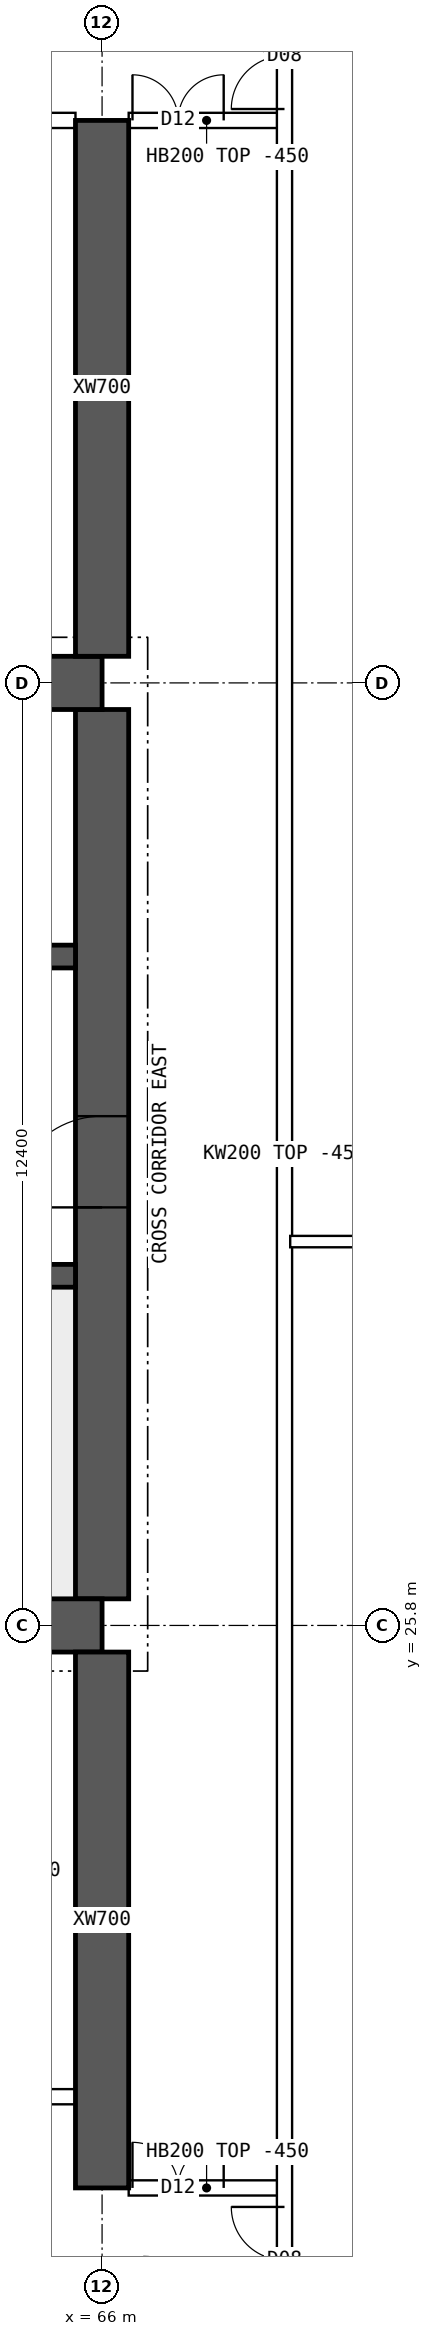
"""IFC4 building model, lengths in metres.
Left out: names, types, materials, properties, quantities, classifications, styles, units other than length and angle.
Written with IfcOpenShell. Run it as: python <this file> out.ifc"""

import sys

from ifc_helpers import new_model, si_unit, direction, frame, frame_2d, origin, place, context, subcontext, project, spatial, polyline, rectangle, outline, extrude, element, fill, save


model = new_model("IFC4")
c1 = context("Model", 3, precision=1e-05, world=origin(), true_north=direction((0.0, 1.0)))
c2 = subcontext(c1, "Body", "Model", "MODEL_VIEW")
j1 = project(units=[si_unit("LENGTHUNIT", "METRE"), si_unit("PLANEANGLEUNIT", "RADIAN")], contexts=[c1])
p1 = place(None, origin())
s1 = spatial("IfcSite", under=j1, at=p1, CompositionType="ELEMENT")
p2 = place(p1, origin())
s2 = spatial("IfcBuilding", under=s1, at=p2, CompositionType="ELEMENT")
p3 = place(p2, frame((0.0, 0.0, 242.8)))
s3 = spatial("IfcBuildingStorey", under=s2, at=p3, CompositionType="ELEMENT", Elevation=242.8)
for number, where, z_axis, x_axis in (
    (1, (18.0, 25.8, 0.0), (0.0, 0.0, 1.0), (1.0, 0.0, 0.0)),
    (2, (18.0, 38.2, 0.0), (0.0, 0.0, 1.0), (1.0, 0.0, 0.0)),
):
    element("IfcWall", number, at=place(p3, frame(where, z_axis=z_axis, x_axis=x_axis)), inside=s3, PredefinedType="SHEAR", context=c2, shape_type="SweptSolid", body=[
        extrude(rectangle(XDim=48.0, YDim=0.7, at=frame_2d((24.0, 0.0))), origin(), (0.0, 0.0, 1.0), 3.75),
    ])
p4 = place(p3, frame((66.0, 26.15, 0.0), z_axis=(0.0, 0.0, 1.0), x_axis=(0.0, 1.0, 0.0)))
e3 = element("IfcWall", 3, at=p4, inside=s3, PredefinedType="SHEAR", context=c2, shape_type="SweptSolid", body=[
    extrude(rectangle(XDim=11.7, YDim=0.7, at=frame_2d((5.85, 0.0))), origin(), (0.0, 0.0, 1.0), 3.75),
])
p5 = place(p4, frame((5.15, 0.0, 0.0)))
e4 = element("IfcOpeningElement", 4, at=p5, cuts=e3, PredefinedType="OPENING", context=c2, shape_type="SweptSolid", body=[
    extrude(rectangle(XDim=1.2, YDim=2.1, at=frame_2d((0.6, 1.05))), frame((0.0, 0.36, 0.0), z_axis=(0.0, -1.0, 0.0), x_axis=(1.0, 0.0, 0.0)), (0.0, 0.0, 1.0), 0.72),
])
p6 = place(p3, frame((18.35, 30.4, 0.0), z_axis=(0.0, 0.0, 1.0), x_axis=(1.0, 0.0, 0.0)))
e5 = element("IfcWall", 5, at=p6, inside=s3, PredefinedType="SHEAR", context=c2, shape_type="SweptSolid", body=[
    extrude(rectangle(XDim=47.3, YDim=0.3, at=frame_2d((23.65, 0.0))), origin(), (0.0, 0.0, 1.0), 3.75),
])
p7 = place(p6, frame((0.4, 0.0, 0.0)))
e6 = element("IfcOpeningElement", 6, at=p7, cuts=e5, PredefinedType="OPENING", context=c2, shape_type="SweptSolid", body=[
    extrude(rectangle(XDim=1.0, YDim=2.1, at=frame_2d((0.5, 1.05))), frame((0.0, 0.16, 0.0), z_axis=(0.0, -1.0, 0.0), x_axis=(1.0, 0.0, 0.0)), (0.0, 0.0, 1.0), 0.32),
])
p8 = place(p6, frame((45.9, 0.0, 0.0)))
e7 = element("IfcOpeningElement", 7, at=p8, cuts=e5, PredefinedType="OPENING", context=c2, shape_type="SweptSolid", body=[
    extrude(rectangle(XDim=1.0, YDim=2.1, at=frame_2d((0.5, 1.05))), frame((0.0, 0.16, 0.0), z_axis=(0.0, -1.0, 0.0), x_axis=(1.0, 0.0, 0.0)), (0.0, 0.0, 1.0), 0.32),
])
p9 = place(p6, frame((8.4, 0.0, 0.0)))
e8 = element("IfcOpeningElement", 8, at=p9, cuts=e5, PredefinedType="OPENING", context=c2, shape_type="SweptSolid", body=[
    extrude(rectangle(XDim=1.1, YDim=2.1, at=frame_2d((0.55, 1.05))), frame((0.0, 0.16, 0.0), z_axis=(0.0, -1.0, 0.0), x_axis=(1.0, 0.0, 0.0)), (0.0, 0.0, 1.0), 0.32),
])
p10 = place(p6, frame((11.0, 0.0, 0.0)))
e9 = element("IfcOpeningElement", 9, at=p10, cuts=e5, PredefinedType="OPENING", context=c2, shape_type="SweptSolid", body=[
    extrude(rectangle(XDim=1.1, YDim=2.1, at=frame_2d((0.55, 1.05))), frame((0.0, 0.16, 0.0), z_axis=(0.0, -1.0, 0.0), x_axis=(1.0, 0.0, 0.0)), (0.0, 0.0, 1.0), 0.32),
])
p11 = place(p6, frame((13.6, 0.0, 0.0)))
e10 = element("IfcOpeningElement", 10, at=p11, cuts=e5, PredefinedType="OPENING", context=c2, shape_type="SweptSolid", body=[
    extrude(rectangle(XDim=1.1, YDim=2.1, at=frame_2d((0.55, 1.05))), frame((0.0, 0.16, 0.0), z_axis=(0.0, -1.0, 0.0), x_axis=(1.0, 0.0, 0.0)), (0.0, 0.0, 1.0), 0.32),
])
p12 = place(p6, frame((16.2, 0.0, 0.0)))
e11 = element("IfcOpeningElement", 11, at=p12, cuts=e5, PredefinedType="OPENING", context=c2, shape_type="SweptSolid", body=[
    extrude(rectangle(XDim=1.1, YDim=2.1, at=frame_2d((0.55, 1.05))), frame((0.0, 0.16, 0.0), z_axis=(0.0, -1.0, 0.0), x_axis=(1.0, 0.0, 0.0)), (0.0, 0.0, 1.0), 0.32),
])
p13 = place(p6, frame((18.975, 0.0, 0.0)))
e12 = element("IfcOpeningElement", 12, at=p13, cuts=e5, PredefinedType="OPENING", context=c2, shape_type="SweptSolid", body=[
    extrude(rectangle(XDim=0.9, YDim=2.1, at=frame_2d((0.45, 1.05))), frame((0.0, 0.16, 0.0), z_axis=(0.0, -1.0, 0.0), x_axis=(1.0, 0.0, 0.0)), (0.0, 0.0, 1.0), 0.32),
])
p14 = place(p6, frame((24.475, 0.0, 0.0)))
e13 = element("IfcOpeningElement", 13, at=p14, cuts=e5, PredefinedType="OPENING", context=c2, shape_type="SweptSolid", body=[
    extrude(rectangle(XDim=0.9, YDim=2.1, at=frame_2d((0.45, 1.05))), frame((0.0, 0.16, 0.0), z_axis=(0.0, -1.0, 0.0), x_axis=(1.0, 0.0, 0.0)), (0.0, 0.0, 1.0), 0.32),
])
p15 = place(p6, frame((30.267, 0.0, 0.0)))
e14 = element("IfcOpeningElement", 14, at=p15, cuts=e5, PredefinedType="OPENING", context=c2, shape_type="SweptSolid", body=[
    extrude(rectangle(XDim=1.1, YDim=2.1, at=frame_2d((0.55, 1.05))), frame((0.0, 0.16, 0.0), z_axis=(0.0, -1.0, 0.0), x_axis=(1.0, 0.0, 0.0)), (0.0, 0.0, 1.0), 0.32),
])
p16 = place(p6, frame((33.8, 0.0, 0.0)))
e15 = element("IfcOpeningElement", 15, at=p16, cuts=e5, PredefinedType="OPENING", context=c2, shape_type="SweptSolid", body=[
    extrude(rectangle(XDim=1.1, YDim=2.1, at=frame_2d((0.55, 1.05))), frame((0.0, 0.16, 0.0), z_axis=(0.0, -1.0, 0.0), x_axis=(1.0, 0.0, 0.0)), (0.0, 0.0, 1.0), 0.32),
])
p17 = place(p6, frame((37.333, 0.0, 0.0)))
e16 = element("IfcOpeningElement", 16, at=p17, cuts=e5, PredefinedType="OPENING", context=c2, shape_type="SweptSolid", body=[
    extrude(rectangle(XDim=1.1, YDim=2.1, at=frame_2d((0.55, 1.05))), frame((0.0, 0.16, 0.0), z_axis=(0.0, -1.0, 0.0), x_axis=(1.0, 0.0, 0.0)), (0.0, 0.0, 1.0), 0.32),
])
p18 = place(p3, frame((18.35, 34.6, 0.0), z_axis=(0.0, 0.0, 1.0), x_axis=(1.0, 0.0, 0.0)))
e17 = element("IfcWall", 17, at=p18, inside=s3, PredefinedType="SHEAR", context=c2, shape_type="SweptSolid", body=[
    extrude(rectangle(XDim=47.3, YDim=0.3, at=frame_2d((23.65, 0.0))), origin(), (0.0, 0.0, 1.0), 3.75),
])
p19 = place(p18, frame((0.9, 0.0, 0.0)))
e18 = element("IfcOpeningElement", 18, at=p19, cuts=e17, PredefinedType="OPENING", context=c2, shape_type="SweptSolid", body=[
    extrude(rectangle(XDim=1.1, YDim=2.1, at=frame_2d((0.55, 1.05))), frame((0.0, 0.16, 0.0), z_axis=(0.0, -1.0, 0.0), x_axis=(1.0, 0.0, 0.0)), (0.0, 0.0, 1.0), 0.32),
])
p20 = place(p18, frame((45.3, 0.0, 0.0)))
e19 = element("IfcOpeningElement", 19, at=p20, cuts=e17, PredefinedType="OPENING", context=c2, shape_type="SweptSolid", body=[
    extrude(rectangle(XDim=1.1, YDim=2.1, at=frame_2d((0.55, 1.05))), frame((0.0, 0.16, 0.0), z_axis=(0.0, -1.0, 0.0), x_axis=(1.0, 0.0, 0.0)), (0.0, 0.0, 1.0), 0.32),
])
p21 = place(p18, frame((4.25, 0.0, 0.0)))
e20 = element("IfcOpeningElement", 20, at=p21, cuts=e17, PredefinedType="OPENING", context=c2, shape_type="SweptSolid", body=[
    extrude(rectangle(XDim=0.9, YDim=2.1, at=frame_2d((0.45, 1.05))), frame((0.0, 0.16, 0.0), z_axis=(0.0, -1.0, 0.0), x_axis=(1.0, 0.0, 0.0)), (0.0, 0.0, 1.0), 0.32),
])
p22 = place(p18, frame((42.15, 0.0, 0.0)))
e21 = element("IfcOpeningElement", 21, at=p22, cuts=e17, PredefinedType="OPENING", context=c2, shape_type="SweptSolid", body=[
    extrude(rectangle(XDim=0.9, YDim=2.1, at=frame_2d((0.45, 1.05))), frame((0.0, 0.16, 0.0), z_axis=(0.0, -1.0, 0.0), x_axis=(1.0, 0.0, 0.0)), (0.0, 0.0, 1.0), 0.32),
])
p23 = place(p18, frame((9.025, 0.0, 0.0)))
e22 = element("IfcOpeningElement", 22, at=p23, cuts=e17, PredefinedType="OPENING", context=c2, shape_type="SweptSolid", body=[
    extrude(rectangle(XDim=0.9, YDim=2.1, at=frame_2d((0.45, 1.05))), frame((0.0, 0.16, 0.0), z_axis=(0.0, -1.0, 0.0), x_axis=(1.0, 0.0, 0.0)), (0.0, 0.0, 1.0), 0.32),
])
p24 = place(p18, frame((12.999, 0.0, 0.0)))
e23 = element("IfcOpeningElement", 23, at=p24, cuts=e17, PredefinedType="OPENING", context=c2, shape_type="SweptSolid", body=[
    extrude(rectangle(XDim=0.9, YDim=2.1, at=frame_2d((0.45, 1.05))), frame((0.0, 0.16, 0.0), z_axis=(0.0, -1.0, 0.0), x_axis=(1.0, 0.0, 0.0)), (0.0, 0.0, 1.0), 0.32),
])
p25 = place(p18, frame((16.646, 0.0, 0.0)))
e24 = element("IfcOpeningElement", 24, at=p25, cuts=e17, PredefinedType="OPENING", context=c2, shape_type="SweptSolid", body=[
    extrude(rectangle(XDim=0.9, YDim=2.1, at=frame_2d((0.45, 1.05))), frame((0.0, 0.16, 0.0), z_axis=(0.0, -1.0, 0.0), x_axis=(1.0, 0.0, 0.0)), (0.0, 0.0, 1.0), 0.32),
])
p26 = place(p18, frame((20.405, 0.0, 0.0)))
e25 = element("IfcOpeningElement", 25, at=p26, cuts=e17, PredefinedType="OPENING", context=c2, shape_type="SweptSolid", body=[
    extrude(rectangle(XDim=0.9, YDim=2.1, at=frame_2d((0.45, 1.05))), frame((0.0, 0.16, 0.0), z_axis=(0.0, -1.0, 0.0), x_axis=(1.0, 0.0, 0.0)), (0.0, 0.0, 1.0), 0.32),
])
p27 = place(p18, frame((24.811, 0.0, 0.0)))
e26 = element("IfcOpeningElement", 26, at=p27, cuts=e17, PredefinedType="OPENING", context=c2, shape_type="SweptSolid", body=[
    extrude(rectangle(XDim=0.9, YDim=2.1, at=frame_2d((0.45, 1.05))), frame((0.0, 0.16, 0.0), z_axis=(0.0, -1.0, 0.0), x_axis=(1.0, 0.0, 0.0)), (0.0, 0.0, 1.0), 0.32),
])
p28 = place(p18, frame((27.608, 0.0, 0.0)))
e27 = element("IfcOpeningElement", 27, at=p28, cuts=e17, PredefinedType="OPENING", context=c2, shape_type="SweptSolid", body=[
    extrude(rectangle(XDim=0.9, YDim=2.1, at=frame_2d((0.45, 1.05))), frame((0.0, 0.16, 0.0), z_axis=(0.0, -1.0, 0.0), x_axis=(1.0, 0.0, 0.0)), (0.0, 0.0, 1.0), 0.32),
])
p29 = place(p18, frame((29.778, 0.0, 0.0)))
e28 = element("IfcOpeningElement", 28, at=p29, cuts=e17, PredefinedType="OPENING", context=c2, shape_type="SweptSolid", body=[
    extrude(rectangle(XDim=0.9, YDim=2.1, at=frame_2d((0.45, 1.05))), frame((0.0, 0.16, 0.0), z_axis=(0.0, -1.0, 0.0), x_axis=(1.0, 0.0, 0.0)), (0.0, 0.0, 1.0), 0.32),
])
p30 = place(p18, frame((33.577, 0.0, 0.0)))
e29 = element("IfcOpeningElement", 29, at=p30, cuts=e17, PredefinedType="OPENING", context=c2, shape_type="SweptSolid", body=[
    extrude(rectangle(XDim=0.9, YDim=2.1, at=frame_2d((0.45, 1.05))), frame((0.0, 0.16, 0.0), z_axis=(0.0, -1.0, 0.0), x_axis=(1.0, 0.0, 0.0)), (0.0, 0.0, 1.0), 0.32),
])
p31 = place(p18, frame((37.528, 0.0, 0.0)))
e30 = element("IfcOpeningElement", 30, at=p31, cuts=e17, PredefinedType="OPENING", context=c2, shape_type="SweptSolid", body=[
    extrude(rectangle(XDim=0.9, YDim=2.1, at=frame_2d((0.45, 1.05))), frame((0.0, 0.16, 0.0), z_axis=(0.0, -1.0, 0.0), x_axis=(1.0, 0.0, 0.0)), (0.0, 0.0, 1.0), 0.32),
])
for number, where, z_axis, x_axis in (
    (31, (66.0, 18.4, 0.0), (0.0, 0.0, 1.0), (0.0, 1.0, 0.0)),
    (32, (66.0, 38.55, 0.0), (0.0, 0.0, 1.0), (0.0, 1.0, 0.0)),
):
    element("IfcWall", number, at=place(p3, frame(where, z_axis=z_axis, x_axis=x_axis)), inside=s3, PredefinedType="SHEAR", context=c2, shape_type="SweptSolid", body=[
        extrude(rectangle(XDim=7.05, YDim=0.7, at=frame_2d((3.525, 0.0))), origin(), (0.0, 0.0, 1.0), 3.75),
    ])
p32 = place(p3, frame((66.35, 18.4, 0.0), z_axis=(0.0, 0.0, 1.0), x_axis=(1.0, 0.0, 0.0)))
e33 = element("IfcWall", 33, at=p32, inside=s3, PredefinedType="SOLIDWALL", context=c2, shape_type="SweptSolid", body=[
    extrude(rectangle(XDim=2.05, YDim=0.2, at=frame_2d((1.025, 0.0))), origin(), (0.0, 0.0, 1.0), 3.3),
])
p33 = place(p32, frame((0.05, 0.0, 0.0)))
e34 = element("IfcOpeningElement", 34, at=p33, cuts=e33, PredefinedType="OPENING", context=c2, shape_type="SweptSolid", body=[
    extrude(rectangle(XDim=1.2, YDim=2.1, at=frame_2d((0.6, 1.05))), frame((0.0, 0.11, 0.0), z_axis=(0.0, -1.0, 0.0), x_axis=(1.0, 0.0, 0.0)), (0.0, 0.0, 1.0), 0.22),
])
p34 = place(p3, frame((60.35, 45.6, 0.0), z_axis=(0.0, 0.0, 1.0), x_axis=(1.0, 0.0, 0.0)))
e35 = element("IfcWall", 35, at=p34, inside=s3, PredefinedType="SOLIDWALL", context=c2, shape_type="SweptSolid", body=[
    extrude(rectangle(XDim=5.3, YDim=0.2, at=frame_2d((2.65, 0.0))), origin(), (0.0, 0.0, 1.0), 3.3),
])
p35 = place(p34, frame((0.525, 0.0, 0.0)))
e36 = element("IfcOpeningElement", 36, at=p35, cuts=e35, PredefinedType="OPENING", context=c2, shape_type="SweptSolid", body=[
    extrude(rectangle(XDim=1.0, YDim=2.1, at=frame_2d((0.5, 1.05))), frame((0.0, 0.11, 0.0), z_axis=(0.0, -1.0, 0.0), x_axis=(1.0, 0.0, 0.0)), (0.0, 0.0, 1.0), 0.22),
])
p36 = place(p3, frame((66.35, 45.6, 0.0), z_axis=(0.0, 0.0, 1.0), x_axis=(1.0, 0.0, 0.0)))
e37 = element("IfcWall", 37, at=p36, inside=s3, PredefinedType="SOLIDWALL", context=c2, shape_type="SweptSolid", body=[
    extrude(rectangle(XDim=2.05, YDim=0.2, at=frame_2d((1.025, 0.0))), origin(), (0.0, 0.0, 1.0), 3.3),
])
p37 = place(p36, frame((0.05, 0.0, 0.0)))
e38 = element("IfcOpeningElement", 38, at=p37, cuts=e37, PredefinedType="OPENING", context=c2, shape_type="SweptSolid", body=[
    extrude(rectangle(XDim=1.2, YDim=2.1, at=frame_2d((0.6, 1.05))), frame((0.0, 0.11, 0.0), z_axis=(0.0, -1.0, 0.0), x_axis=(1.0, 0.0, 0.0)), (0.0, 0.0, 1.0), 0.22),
])
p38 = place(p3, frame((60.35, 19.6, 0.0), z_axis=(0.0, 0.0, 1.0), x_axis=(1.0, 0.0, 0.0)))
e39 = element("IfcWall", 39, at=p38, inside=s3, PredefinedType="SOLIDWALL", context=c2, shape_type="SweptSolid", body=[
    extrude(rectangle(XDim=5.3, YDim=0.2, at=frame_2d((2.65, 0.0))), origin(), (0.0, 0.0, 1.0), 3.3),
])
p39 = place(p38, frame((0.525, 0.0, 0.0)))
e40 = element("IfcOpeningElement", 40, at=p39, cuts=e39, PredefinedType="OPENING", context=c2, shape_type="SweptSolid", body=[
    extrude(rectangle(XDim=1.0, YDim=2.1, at=frame_2d((0.5, 1.05))), frame((0.0, 0.11, 0.0), z_axis=(0.0, -1.0, 0.0), x_axis=(1.0, 0.0, 0.0)), (0.0, 0.0, 1.0), 0.22),
])
p40 = place(p3, frame((68.475, 30.85, 0.0), z_axis=(0.0, 0.0, 1.0), x_axis=(1.0, 0.0, 0.0)))
e41 = element("IfcWall", 41, at=p40, inside=s3, PredefinedType="PARTITIONING", context=c2, shape_type="SweptSolid", body=[
    extrude(outline(polyline([(0.0, 0.0), (6.82, 0.0), (6.82, 3.3), (3.827, 3.3), (3.825, 2.85), (3.227, 2.85), (3.225, 3.3), (0.0, 3.3), (0.0, 0.0)])), frame((0.0, 0.075, 0.0), z_axis=(0.0, -1.0, 0.0), x_axis=(1.0, 0.0, 0.0)), (0.0, 0.0, 1.0), 0.15),
])
p41 = place(p3, frame((68.4, 11.646, 0.0), z_axis=(0.0, 0.0, 1.0), x_axis=(0.0, 1.0, 0.0)))
e42 = element("IfcWall", 42, at=p41, inside=s3, PredefinedType="SOLIDWALL", context=c2, shape_type="SweptSolid", body=[
    extrude(rectangle(XDim=40.708, YDim=0.2, at=frame_2d((20.354, 0.0))), origin(), (0.0, 0.0, 1.0), 3.3),
])
p42 = place(p41, frame((5.104, 0.0, 0.0)))
e43 = element("IfcOpeningElement", 43, at=p42, cuts=e42, PredefinedType="OPENING", context=c2, shape_type="SweptSolid", body=[
    extrude(rectangle(XDim=1.4, YDim=2.1, at=frame_2d((0.7, 1.05))), frame((0.0, 0.11, 0.0), z_axis=(0.0, -1.0, 0.0), x_axis=(1.0, 0.0, 0.0)), (0.0, 0.0, 1.0), 0.22),
])
p43 = place(p41, frame((34.104, 0.0, 0.0)))
e44 = element("IfcOpeningElement", 44, at=p43, cuts=e42, PredefinedType="OPENING", context=c2, shape_type="SweptSolid", body=[
    extrude(rectangle(XDim=1.4, YDim=2.1, at=frame_2d((0.7, 1.05))), frame((0.0, 0.11, 0.0), z_axis=(0.0, -1.0, 0.0), x_axis=(1.0, 0.0, 0.0)), (0.0, 0.0, 1.0), 0.22),
])
p44 = place(p5, origin())
e45 = element("IfcDoor", 45, at=p44, inside=s3, OperationType="SINGLE_SWING_LEFT", PredefinedType="DOOR", context=c2, shape_type="SweptSolid", body=[
    extrude(rectangle(XDim=1.2, YDim=2.1, at=frame_2d((0.6, 1.05))), frame((0.0, 0.025, 0.0), z_axis=(0.0, -1.0, 0.0), x_axis=(1.0, 0.0, 0.0)), (0.0, 0.0, 1.0), 0.05),
])
fill(e4, e45)
p45 = place(p33, origin())
e46 = element("IfcDoor", 46, at=p45, inside=s3, OperationType="DOUBLE_DOOR_SINGLE_SWING", PredefinedType="DOOR", context=c2, shape_type="SweptSolid", body=[
    extrude(rectangle(XDim=1.2, YDim=2.1, at=frame_2d((0.6, 1.05))), frame((0.0, 0.025, 0.0), z_axis=(0.0, -1.0, 0.0), x_axis=(1.0, 0.0, 0.0)), (0.0, 0.0, 1.0), 0.05),
])
fill(e34, e46)
p46 = place(p37, origin())
e47 = element("IfcDoor", 47, at=p46, inside=s3, OperationType="DOUBLE_DOOR_SINGLE_SWING", PredefinedType="DOOR", context=c2, shape_type="SweptSolid", body=[
    extrude(rectangle(XDim=1.2, YDim=2.1, at=frame_2d((0.6, 1.05))), frame((0.0, 0.025, 0.0), z_axis=(0.0, -1.0, 0.0), x_axis=(1.0, 0.0, 0.0)), (0.0, 0.0, 1.0), 0.05),
])
fill(e38, e47)
p47 = place(p42, origin())
e48 = element("IfcDoor", 48, at=p47, inside=s3, OperationType="DOUBLE_DOOR_SINGLE_SWING", PredefinedType="DOOR", context=c2, shape_type="SweptSolid", body=[
    extrude(rectangle(XDim=1.4, YDim=2.1, at=frame_2d((0.7, 1.05))), frame((0.0, 0.025, 0.0), z_axis=(0.0, -1.0, 0.0), x_axis=(1.0, 0.0, 0.0)), (0.0, 0.0, 1.0), 0.05),
])
fill(e43, e48)
p48 = place(p43, origin())
e49 = element("IfcDoor", 49, at=p48, inside=s3, OperationType="DOUBLE_DOOR_SINGLE_SWING", PredefinedType="DOOR", context=c2, shape_type="SweptSolid", body=[
    extrude(rectangle(XDim=1.4, YDim=2.1, at=frame_2d((0.7, 1.05))), frame((0.0, 0.025, 0.0), z_axis=(0.0, -1.0, 0.0), x_axis=(1.0, 0.0, 0.0)), (0.0, 0.0, 1.0), 0.05),
])
fill(e44, e49)
save(model, sys.argv[1])
